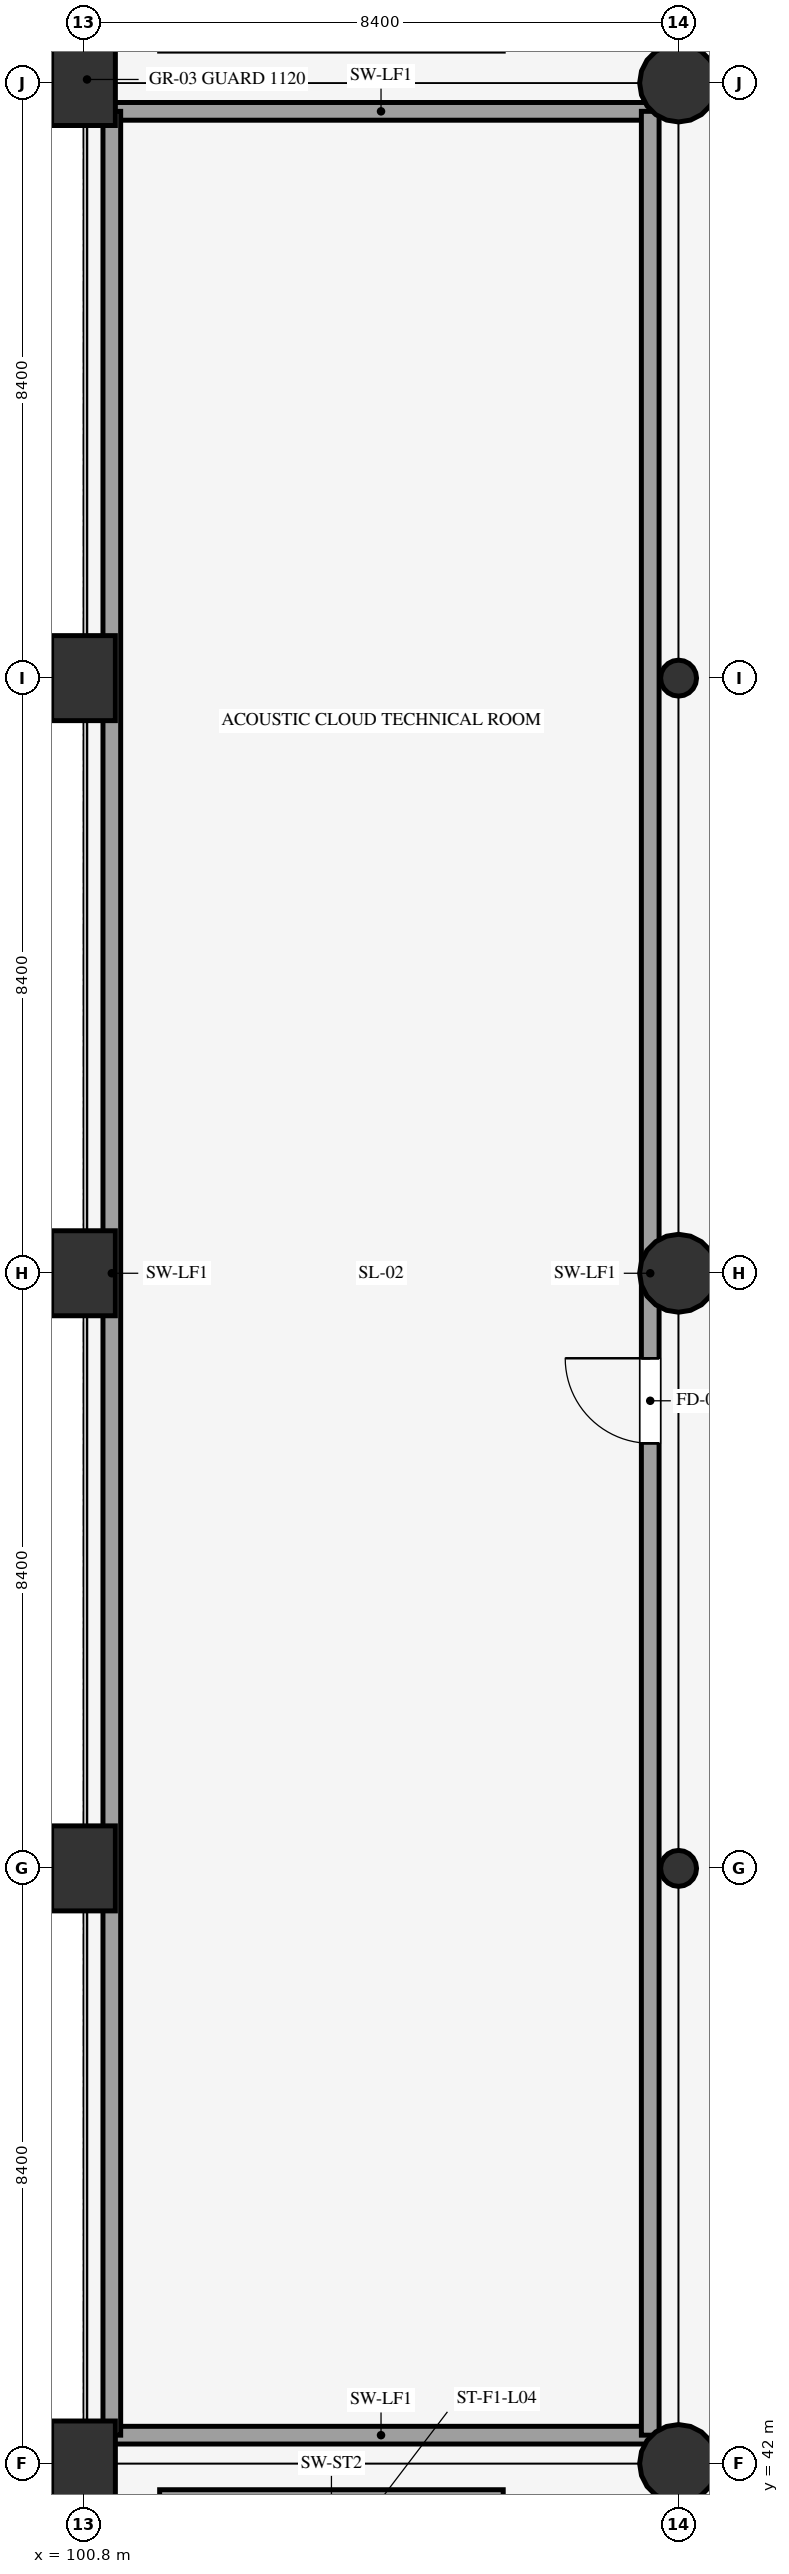
"""IFC4 building model, lengths in metres.
Left out: names, types, materials, properties, quantities, classifications, styles, units other than length and angle.
Written with IfcOpenShell. Run it as: python <this file> out.ifc"""

import sys

from ifc_helpers import new_model, si_unit, direction, frame, frame_2d, origin, origin_2d, place, context, subcontext, project, spatial, rectangle, circle, hollow_circle, extrude, element, fill, save


model = new_model("IFC4")
c1 = context("Model", 3, precision=1e-05, world=origin(), true_north=direction((0.0, 1.0)))
c2 = subcontext(c1, "Body", "Model", "MODEL_VIEW")
j1 = project(units=[si_unit("LENGTHUNIT", "METRE"), si_unit("PLANEANGLEUNIT", "RADIAN")], contexts=[c1])
p1 = place(None, origin())
s1 = spatial("IfcSite", under=j1, at=p1, CompositionType="ELEMENT")
p2 = place(p1, origin())
s2 = spatial("IfcBuilding", under=s1, at=p2, CompositionType="ELEMENT")
p3 = place(p2, frame((0.0, 0.0, 18.9)))
s3 = spatial("IfcBuildingStorey", under=s2, at=p3, CompositionType="ELEMENT", Elevation=18.9)
for number, where, z_axis, x_axis in (
    (1, (100.8, 42.0, 0.0), (0.0, 0.0, 1.0), (1.0, 0.0, 0.0)),
    (2, (100.8, 50.4, 0.0), (0.0, 0.0, 1.0), (1.0, 0.0, 0.0)),
    (3, (100.8, 58.8, 0.0), (0.0, 0.0, 1.0), (1.0, 0.0, 0.0)),
    (4, (100.8, 67.2, 0.0), (0.0, 0.0, 1.0), (1.0, 0.0, 0.0)),
    (5, (100.8, 75.6, 0.0), (0.0, 0.0, 1.0), (1.0, 0.0, 0.0)),
):
    element("IfcColumn", number, at=place(p3, frame(where, z_axis=z_axis, x_axis=x_axis)), inside=s3, PredefinedType="COLUMN", context=c2, shape_type="SweptSolid", body=[
        extrude(rectangle(XDim=0.9, YDim=1.2, at=origin_2d()), origin(), (0.0, 0.0, 1.0), 4.5),
    ])
p4 = place(p3, frame((109.2, 42.0, 0.0), z_axis=(0.0, 0.0, 1.0), x_axis=(1.0, 0.0, 0.0)))
e6 = element("IfcColumn", 6, at=p4, inside=s3, PredefinedType="COLUMN", context=c2, shape_type="SweptSolid", body=[
    extrude(circle(Radius=0.55, at=origin_2d()), origin(), (0.0, 0.0, 1.0), 4.5),
])
p5 = place(p3, frame((109.2, 50.4, 0.0), z_axis=(0.0, 0.0, 1.0), x_axis=(1.0, 0.0, 0.0)))
e7 = element("IfcColumn", 7, at=p5, inside=s3, PredefinedType="COLUMN", context=c2, shape_type="SweptSolid", body=[
    extrude(hollow_circle(Radius=0.254, WallThickness=0.02, at=origin_2d()), origin(), (0.0, 0.0, 1.0), 4.5),
])
p6 = place(p3, frame((109.2, 58.8, 0.0), z_axis=(0.0, 0.0, 1.0), x_axis=(1.0, 0.0, 0.0)))
e8 = element("IfcColumn", 8, at=p6, inside=s3, PredefinedType="COLUMN", context=c2, shape_type="SweptSolid", body=[
    extrude(circle(Radius=0.55, at=origin_2d()), origin(), (0.0, 0.0, 1.0), 4.5),
])
p7 = place(p3, frame((109.2, 67.2, 0.0), z_axis=(0.0, 0.0, 1.0), x_axis=(1.0, 0.0, 0.0)))
e9 = element("IfcColumn", 9, at=p7, inside=s3, PredefinedType="COLUMN", context=c2, shape_type="SweptSolid", body=[
    extrude(hollow_circle(Radius=0.254, WallThickness=0.02, at=origin_2d()), origin(), (0.0, 0.0, 1.0), 4.5),
])
p8 = place(p3, frame((109.2, 75.6, 0.0), z_axis=(0.0, 0.0, 1.0), x_axis=(1.0, 0.0, 0.0)))
e10 = element("IfcColumn", 10, at=p8, inside=s3, PredefinedType="COLUMN", context=c2, shape_type="SweptSolid", body=[
    extrude(circle(Radius=0.55, at=origin_2d()), origin(), (0.0, 0.0, 1.0), 4.5),
])
p9 = place(p3, frame((101.875, 41.505, 0.0), z_axis=(0.0, 0.0, 1.0), x_axis=(1.0, 0.0, 0.0)))
e11 = element("IfcWall", 11, at=p9, inside=s3, PredefinedType="SHEAR", context=c2, shape_type="SweptSolid", body=[
    extrude(rectangle(XDim=4.85, YDim=0.25, at=frame_2d((2.425, 0.0))), origin(), (0.0, 0.0, 1.0), 4.5),
])
for number, where, z_axis, x_axis in (
    (12, (101.2, 42.4, 0.0), (0.0, 0.0, 1.0), (1.0, 0.0, 0.0)),
    (13, (101.2, 75.2, 0.0), (0.0, 0.0, 1.0), (1.0, 0.0, 0.0)),
):
    element("IfcWall", number, at=place(p3, frame(where, z_axis=z_axis, x_axis=x_axis)), inside=s3, PredefinedType="SHEAR", context=c2, shape_type="SweptSolid", body=[
        extrude(rectangle(XDim=7.6, YDim=0.25, at=frame_2d((3.8, 0.0))), origin(), (0.0, 0.0, 1.0), 4.22),
    ])
p10 = place(p3, frame((101.2, 42.4, 0.0), z_axis=(0.0, 0.0, 1.0), x_axis=(0.0, 1.0, 0.0)))
e14 = element("IfcWall", 14, at=p10, inside=s3, PredefinedType="SHEAR", context=c2, shape_type="SweptSolid", body=[
    extrude(rectangle(XDim=32.8, YDim=0.25, at=frame_2d((16.4, 0.0))), origin(), (0.0, 0.0, 1.0), 4.22),
])
p11 = place(p3, frame((108.8, 42.4, 0.0), z_axis=(0.0, 0.0, 1.0), x_axis=(0.0, 1.0, 0.0)))
e15 = element("IfcWall", 15, at=p11, inside=s3, PredefinedType="SHEAR", context=c2, shape_type="SweptSolid", body=[
    extrude(rectangle(XDim=32.8, YDim=0.25, at=frame_2d((16.4, 0.0))), origin(), (0.0, 0.0, 1.0), 4.22),
])
p12 = place(p11, frame((14.0, 0.0, 0.0)))
e16 = element("IfcOpeningElement", 16, at=p12, cuts=e15, PredefinedType="OPENING", context=c2, shape_type="SweptSolid", body=[
    extrude(rectangle(XDim=1.2, YDim=2.15, at=frame_2d((0.6, 1.075))), frame((0.0, 0.135, 0.0), z_axis=(0.0, -1.0, 0.0), x_axis=(1.0, 0.0, 0.0)), (0.0, 0.0, 1.0), 0.27),
])
p13 = place(p12, origin())
e17 = element("IfcDoor", 17, at=p13, inside=s3, OperationType="SINGLE_SWING_RIGHT", PredefinedType="DOOR", context=c2, shape_type="SweptSolid", body=[
    extrude(rectangle(XDim=1.2, YDim=2.15, at=frame_2d((0.6, 1.075))), frame((0.0, 0.025, 0.0), z_axis=(0.0, -1.0, 0.0), x_axis=(1.0, 0.0, 0.0)), (0.0, 0.0, 1.0), 0.05),
])
fill(e16, e17)
save(model, sys.argv[1])
